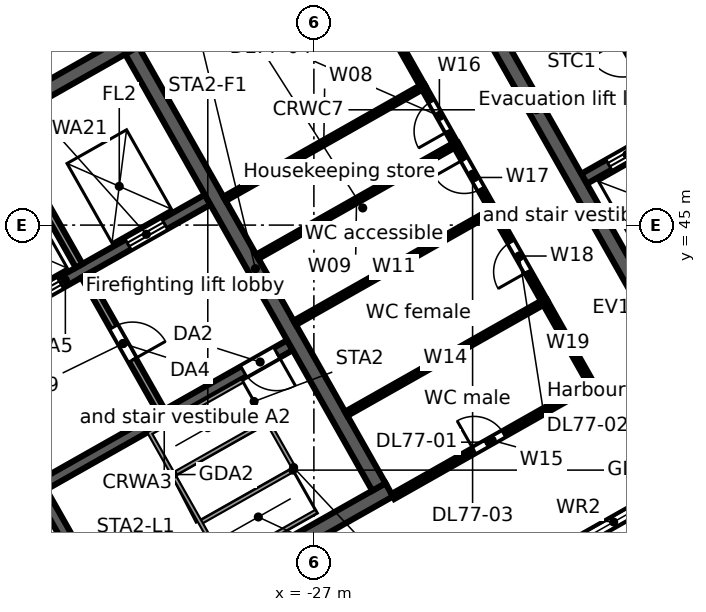
"""IFC4 building model, lengths in metres.
Left out: names, types, materials, properties, quantities, classifications, styles, units other than length and angle.
Written with IfcOpenShell. Run it as: python <this file> out.ifc"""

import sys

from ifc_helpers import new_model, si_unit, direction, frame, frame_2d, origin, place, context, subcontext, project, spatial, rectangle, extrude, element, fill, save


model = new_model("IFC4")
c1 = context("Model", 3, precision=1e-05, world=origin(), true_north=direction((0.0, 1.0)))
c2 = subcontext(c1, "Body", "Model", "MODEL_VIEW")
j1 = project(units=[si_unit("LENGTHUNIT", "METRE"), si_unit("PLANEANGLEUNIT", "RADIAN")], contexts=[c1])
p1 = place(None, origin())
s1 = spatial("IfcSite", under=j1, at=p1, CompositionType="ELEMENT")
p2 = place(p1, origin())
s2 = spatial("IfcBuilding", under=s1, at=p2, CompositionType="ELEMENT")
p3 = place(p2, frame((0.0, 0.0, 339.3)))
s3 = spatial("IfcBuildingStorey", under=s2, at=p3, CompositionType="ELEMENT", Elevation=339.3)
p4 = place(p3, frame((-3.017, 46.293, 0.0), z_axis=(0.0, 0.0, 1.0), x_axis=(-0.870355474887, -0.492423950812, 0.0)))
e1 = element("IfcWall", 1, at=p4, inside=s3, PredefinedType="STANDARD", context=c2, shape_type="SweptSolid", body=[
    extrude(rectangle(XDim=40.34, YDim=0.25, at=frame_2d((20.17, 0.0))), origin(), (0.0, 0.0, 1.0), 3.52),
])
p5 = place(p4, frame((37.428, 0.0, 0.8)))
e2 = element("IfcOpeningElement", 2, at=p5, cuts=e1, PredefinedType="OPENING", context=c2, shape_type="SweptSolid", body=[
    extrude(rectangle(XDim=2.4, YDim=2.2, at=frame_2d((1.2, 1.1))), frame((0.0, 0.135, 0.0), z_axis=(0.0, -1.0, 0.0), x_axis=(1.0, 0.0, 0.0)), (0.0, 0.0, 1.0), 0.27),
])
p6 = place(p4, frame((34.372, 0.0, 0.0)))
e3 = element("IfcOpeningElement", 3, at=p6, cuts=e1, PredefinedType="OPENING", context=c2, shape_type="SweptSolid", body=[
    extrude(rectangle(XDim=1.8, YDim=2.4, at=frame_2d((0.9, 1.2))), frame((0.0, 0.135, 0.0), z_axis=(0.0, -1.0, 0.0), x_axis=(1.0, 0.0, 0.0)), (0.0, 0.0, 1.0), 0.27),
])
p7 = place(p4, frame((30.716, 0.0, 0.8)))
e4 = element("IfcOpeningElement", 4, at=p7, cuts=e1, PredefinedType="OPENING", context=c2, shape_type="SweptSolid", body=[
    extrude(rectangle(XDim=2.4, YDim=2.2, at=frame_2d((1.2, 1.1))), frame((0.0, 0.135, 0.0), z_axis=(0.0, -1.0, 0.0), x_axis=(1.0, 0.0, 0.0)), (0.0, 0.0, 1.0), 0.27),
])
p8 = place(p4, frame((27.36, 0.0, 0.8)))
e5 = element("IfcOpeningElement", 5, at=p8, cuts=e1, PredefinedType="OPENING", context=c2, shape_type="SweptSolid", body=[
    extrude(rectangle(XDim=2.4, YDim=2.2, at=frame_2d((1.2, 1.1))), frame((0.0, 0.135, 0.0), z_axis=(0.0, -1.0, 0.0), x_axis=(1.0, 0.0, 0.0)), (0.0, 0.0, 1.0), 0.27),
])
p9 = place(p4, frame((24.304, 0.0, 0.0)))
e6 = element("IfcOpeningElement", 6, at=p9, cuts=e1, PredefinedType="OPENING", context=c2, shape_type="SweptSolid", body=[
    extrude(rectangle(XDim=1.8, YDim=2.4, at=frame_2d((0.9, 1.2))), frame((0.0, 0.135, 0.0), z_axis=(0.0, -1.0, 0.0), x_axis=(1.0, 0.0, 0.0)), (0.0, 0.0, 1.0), 0.27),
])
p10 = place(p4, frame((20.648, 0.0, 0.8)))
e7 = element("IfcOpeningElement", 7, at=p10, cuts=e1, PredefinedType="OPENING", context=c2, shape_type="SweptSolid", body=[
    extrude(rectangle(XDim=2.4, YDim=2.2, at=frame_2d((1.2, 1.1))), frame((0.0, 0.135, 0.0), z_axis=(0.0, -1.0, 0.0), x_axis=(1.0, 0.0, 0.0)), (0.0, 0.0, 1.0), 0.27),
])
p11 = place(p4, frame((17.292, 0.0, 0.8)))
e8 = element("IfcOpeningElement", 8, at=p11, cuts=e1, PredefinedType="OPENING", context=c2, shape_type="SweptSolid", body=[
    extrude(rectangle(XDim=2.4, YDim=2.2, at=frame_2d((1.2, 1.1))), frame((0.0, 0.135, 0.0), z_axis=(0.0, -1.0, 0.0), x_axis=(1.0, 0.0, 0.0)), (0.0, 0.0, 1.0), 0.27),
])
p12 = place(p4, frame((14.236, 0.0, 0.0)))
e9 = element("IfcOpeningElement", 9, at=p12, cuts=e1, PredefinedType="OPENING", context=c2, shape_type="SweptSolid", body=[
    extrude(rectangle(XDim=1.8, YDim=2.4, at=frame_2d((0.9, 1.2))), frame((0.0, 0.135, 0.0), z_axis=(0.0, -1.0, 0.0), x_axis=(1.0, 0.0, 0.0)), (0.0, 0.0, 1.0), 0.27),
])
p13 = place(p4, frame((10.58, 0.0, 0.8)))
e10 = element("IfcOpeningElement", 10, at=p13, cuts=e1, PredefinedType="OPENING", context=c2, shape_type="SweptSolid", body=[
    extrude(rectangle(XDim=2.4, YDim=2.2, at=frame_2d((1.2, 1.1))), frame((0.0, 0.135, 0.0), z_axis=(0.0, -1.0, 0.0), x_axis=(1.0, 0.0, 0.0)), (0.0, 0.0, 1.0), 0.27),
])
p14 = place(p4, frame((7.224, 0.0, 0.8)))
e11 = element("IfcOpeningElement", 11, at=p14, cuts=e1, PredefinedType="OPENING", context=c2, shape_type="SweptSolid", body=[
    extrude(rectangle(XDim=2.4, YDim=2.2, at=frame_2d((1.2, 1.1))), frame((0.0, 0.135, 0.0), z_axis=(0.0, -1.0, 0.0), x_axis=(1.0, 0.0, 0.0)), (0.0, 0.0, 1.0), 0.27),
])
p15 = place(p4, frame((4.168, 0.0, 0.0)))
e12 = element("IfcOpeningElement", 12, at=p15, cuts=e1, PredefinedType="OPENING", context=c2, shape_type="SweptSolid", body=[
    extrude(rectangle(XDim=1.8, YDim=2.4, at=frame_2d((0.9, 1.2))), frame((0.0, 0.135, 0.0), z_axis=(0.0, -1.0, 0.0), x_axis=(1.0, 0.0, 0.0)), (0.0, 0.0, 1.0), 0.27),
])
p16 = place(p4, frame((0.512, 0.0, 0.8)))
e13 = element("IfcOpeningElement", 13, at=p16, cuts=e1, PredefinedType="OPENING", context=c2, shape_type="SweptSolid", body=[
    extrude(rectangle(XDim=2.4, YDim=2.2, at=frame_2d((1.2, 1.1))), frame((0.0, 0.135, 0.0), z_axis=(0.0, -1.0, 0.0), x_axis=(1.0, 0.0, 0.0)), (0.0, 0.0, 1.0), 0.27),
])
p17 = place(p3, frame((-39.813, 29.662, 0.0), z_axis=(0.0, 0.0, 1.0), x_axis=(0.870350116061, 0.492433422375, 0.0)))
e14 = element("IfcWall", 14, at=p17, inside=s3, PredefinedType="SOLIDWALL", context=c2, shape_type="SweptSolid", body=[
    extrude(rectangle(XDim=17.0, YDim=0.4, at=frame_2d((8.5, 0.0))), origin(), (0.0, 0.0, 1.0), 3.52),
])
p18 = place(p17, frame((7.2, 0.0, 0.0)))
e15 = element("IfcOpeningElement", 15, at=p18, cuts=e14, PredefinedType="OPENING", context=c2, shape_type="SweptSolid", body=[
    extrude(rectangle(XDim=1.2, YDim=2.1, at=frame_2d((0.6, 1.05))), frame((0.0, 0.21, 0.0), z_axis=(0.0, -1.0, 0.0), x_axis=(1.0, 0.0, 0.0)), (0.0, 0.0, 1.0), 0.42),
])
p19 = place(p3, frame((-34.245, 38.097, 0.0), z_axis=(0.0, 0.0, 1.0), x_axis=(0.870356351998, 0.492422400523, 0.0)))
e16 = element("IfcWall", 16, at=p19, inside=s3, PredefinedType="SOLIDWALL", context=c2, shape_type="SweptSolid", body=[
    extrude(rectangle(XDim=7.6, YDim=0.3, at=frame_2d((3.8, 0.0))), origin(), (0.0, 0.0, 1.0), 3.52),
])
p20 = place(p19, frame((6.2, 0.0, 0.0)))
e17 = element("IfcOpeningElement", 17, at=p20, cuts=e16, PredefinedType="OPENING", context=c2, shape_type="SweptSolid", body=[
    extrude(rectangle(XDim=1.0, YDim=2.1, at=frame_2d((0.5, 1.05))), frame((0.0, 0.16, 0.0), z_axis=(0.0, -1.0, 0.0), x_axis=(1.0, 0.0, 0.0)), (0.0, 0.0, 1.0), 0.32),
])
p21 = place(p3, frame((-37.282, 41.435, 0.0), z_axis=(0.0, 0.0, 1.0), x_axis=(0.870361315115, 0.492413628113, 0.0)))
e18 = element("IfcWall", 18, at=p21, inside=s3, PredefinedType="SOLIDWALL", context=c2, shape_type="SweptSolid", body=[
    extrude(rectangle(XDim=8.6, YDim=0.3, at=frame_2d((4.3, 0.0))), origin(), (0.0, 0.0, 1.0), 3.52),
])
p22 = place(p21, frame((0.65, 0.0, 0.0)))
e19 = element("IfcOpeningElement", 19, at=p22, cuts=e18, PredefinedType="OPENING", context=c2, shape_type="SweptSolid", body=[
    extrude(rectangle(XDim=1.1, YDim=2.1, at=frame_2d((0.55, 1.05))), frame((0.0, 0.16, 0.0), z_axis=(0.0, -1.0, 0.0), x_axis=(1.0, 0.0, 0.0)), (0.0, 0.0, 1.0), 0.32),
])
p23 = place(p21, frame((3.05, 0.0, 0.0)))
e20 = element("IfcOpeningElement", 20, at=p23, cuts=e18, PredefinedType="OPENING", context=c2, shape_type="SweptSolid", body=[
    extrude(rectangle(XDim=1.1, YDim=2.1, at=frame_2d((0.55, 1.05))), frame((0.0, 0.16, 0.0), z_axis=(0.0, -1.0, 0.0), x_axis=(1.0, 0.0, 0.0)), (0.0, 0.0, 1.0), 0.32),
])
p24 = place(p21, frame((6.2, 0.0, 0.0)))
e21 = element("IfcOpeningElement", 21, at=p24, cuts=e18, PredefinedType="OPENING", context=c2, shape_type="SweptSolid", body=[
    extrude(rectangle(XDim=1.1, YDim=2.1, at=frame_2d((0.55, 1.05))), frame((0.0, 0.16, 0.0), z_axis=(0.0, -1.0, 0.0), x_axis=(1.0, 0.0, 0.0)), (0.0, 0.0, 1.0), 0.32),
])
p25 = place(p3, frame((-46.51, 41.499, 0.0), z_axis=(0.0, 0.0, 1.0), x_axis=(0.870356271124, 0.492422543467, 0.0)))
e22 = element("IfcWall", 22, at=p25, inside=s3, PredefinedType="SOLIDWALL", context=c2, shape_type="SweptSolid", body=[
    extrude(rectangle(XDim=17.0, YDim=0.4, at=frame_2d((8.5, 0.0))), origin(), (0.0, 0.0, 1.0), 3.52),
])
p26 = place(p3, frame((-34.171, 37.967, 0.0), z_axis=(0.0, 0.0, 1.0), x_axis=(0.492422543467, -0.870356271124, 0.0)))
e23 = element("IfcWall", 23, at=p26, inside=s3, PredefinedType="SOLIDWALL", context=c2, shape_type="SweptSolid", body=[
    extrude(rectangle(XDim=4.25, YDim=0.3, at=frame_2d((2.125, 0.0))), origin(), (0.0, 0.0, 1.0), 3.52),
])
p27 = place(p3, frame((-33.031, 43.667, 0.0), z_axis=(0.0, 0.0, 1.0), x_axis=(0.492408451753, -0.87036424366, 0.0)))
e24 = element("IfcWall", 24, at=p27, inside=s3, PredefinedType="PARTITIONING", context=c2, shape_type="SweptSolid", body=[
    extrude(rectangle(XDim=4.1, YDim=0.2, at=frame_2d((2.05, 0.0))), origin(), (0.0, 0.0, 1.0), 3.52),
])
p28 = place(p27, frame((1.55, 0.0, 0.0)))
e25 = element("IfcOpeningElement", 25, at=p28, cuts=e24, PredefinedType="OPENING", context=c2, shape_type="SweptSolid", body=[
    extrude(rectangle(XDim=1.0, YDim=2.1, at=frame_2d((0.5, 1.05))), frame((0.0, 0.11, 0.0), z_axis=(0.0, -1.0, 0.0), x_axis=(1.0, 0.0, 0.0)), (0.0, 0.0, 1.0), 0.22),
])
p29 = place(p3, frame((-35.271, 47.628, 0.0), z_axis=(0.0, 0.0, 1.0), x_axis=(0.492422543467, -0.870356271124, 0.0)))
e26 = element("IfcWall", 26, at=p29, inside=s3, PredefinedType="SOLIDWALL", context=c2, shape_type="SweptSolid", body=[
    extrude(rectangle(XDim=4.25, YDim=0.2, at=frame_2d((2.125, 0.0))), origin(), (0.0, 0.0, 1.0), 3.52),
])
p30 = place(p3, frame((-31.79, 49.597, 0.0), z_axis=(0.0, 0.0, 1.0), x_axis=(0.492421663121, -0.870356769198, 0.0)))
e27 = element("IfcWall", 27, at=p30, inside=s3, PredefinedType="SOLIDWALL", context=c2, shape_type="SweptSolid", body=[
    extrude(rectangle(XDim=13.2, YDim=0.4, at=frame_2d((6.6, 0.0))), origin(), (0.0, 0.0, 1.0), 3.52),
])
p31 = place(p3, frame((-19.892, 46.218, 0.0), z_axis=(0.0, 0.0, 1.0), x_axis=(0.870341639186, 0.492448404505, 0.0)))
e28 = element("IfcWall", 28, at=p31, inside=s3, PredefinedType="SOLIDWALL", context=c2, shape_type="SweptSolid", body=[
    extrude(rectangle(XDim=5.1, YDim=0.3, at=frame_2d((2.55, 0.0))), origin(), (0.0, 0.0, 1.0), 3.52),
])
p32 = place(p31, frame((0.75, 0.0, 0.0)))
e29 = element("IfcOpeningElement", 29, at=p32, cuts=e28, PredefinedType="OPENING", context=c2, shape_type="SweptSolid", body=[
    extrude(rectangle(XDim=1.1, YDim=2.1, at=frame_2d((0.55, 1.05))), frame((0.0, 0.16, 0.0), z_axis=(0.0, -1.0, 0.0), x_axis=(1.0, 0.0, 0.0)), (0.0, 0.0, 1.0), 0.32),
])
p33 = place(p31, frame((3.35, 0.0, 0.0)))
e30 = element("IfcOpeningElement", 30, at=p33, cuts=e28, PredefinedType="OPENING", context=c2, shape_type="SweptSolid", body=[
    extrude(rectangle(XDim=1.1, YDim=2.1, at=frame_2d((0.55, 1.05))), frame((0.0, 0.16, 0.0), z_axis=(0.0, -1.0, 0.0), x_axis=(1.0, 0.0, 0.0)), (0.0, 0.0, 1.0), 0.32),
])
p34 = place(p3, frame((-24.4, 53.779, 0.0), z_axis=(0.0, 0.0, 1.0), x_axis=(0.492421663121, -0.870356769198, 0.0)))
e31 = element("IfcWall", 31, at=p34, inside=s3, PredefinedType="SOLIDWALL", context=c2, shape_type="SweptSolid", body=[
    extrude(rectangle(XDim=13.2, YDim=0.4, at=frame_2d((6.6, 0.0))), origin(), (0.0, 0.0, 1.0), 3.52),
])
p35 = place(p3, frame((-19.635, 51.246, 0.0), z_axis=(0.0, 0.0, 1.0), x_axis=(0.492408451753, -0.87036424366, 0.0)))
e32 = element("IfcWall", 32, at=p35, inside=s3, PredefinedType="PARTITIONING", context=c2, shape_type="SweptSolid", body=[
    extrude(rectangle(XDim=4.1, YDim=0.2, at=frame_2d((2.05, 0.0))), origin(), (0.0, 0.0, 1.0), 3.52),
])
p36 = place(p35, frame((1.55, 0.0, 0.0)))
e33 = element("IfcOpeningElement", 33, at=p36, cuts=e32, PredefinedType="OPENING", context=c2, shape_type="SweptSolid", body=[
    extrude(rectangle(XDim=1.0, YDim=2.1, at=frame_2d((0.5, 1.05))), frame((0.0, 0.11, 0.0), z_axis=(0.0, -1.0, 0.0), x_axis=(1.0, 0.0, 0.0)), (0.0, 0.0, 1.0), 0.22),
])
p37 = place(p3, frame((-29.35, 45.692, 0.0), z_axis=(0.0, 0.0, 1.0), x_axis=(0.870318719588, 0.492488909859, 0.0)))
e34 = element("IfcWall", 34, at=p37, inside=s3, PredefinedType="PARTITIONING", context=c2, shape_type="SweptSolid", body=[
    extrude(rectangle(XDim=6.0, YDim=0.125, at=frame_2d((3.0, 0.0))), origin(), (0.0, 0.0, 1.0), 3.52),
])
p38 = place(p3, frame((-28.489, 44.169, 0.0), z_axis=(0.0, 0.0, 1.0), x_axis=(0.870308850352, 0.492506350211, 0.0)))
e35 = element("IfcWall", 35, at=p38, inside=s3, PredefinedType="PARTITIONING", context=c2, shape_type="SweptSolid", body=[
    extrude(rectangle(XDim=6.0, YDim=0.125, at=frame_2d((3.0, 0.0))), origin(), (0.0, 0.0, 1.0), 3.52),
])
p39 = place(p3, frame((-27.504, 42.428, 0.0), z_axis=(0.0, 0.0, 1.0), x_axis=(0.870308850352, 0.492506350211, 0.0)))
e36 = element("IfcWall", 36, at=p39, inside=s3, PredefinedType="PARTITIONING", context=c2, shape_type="SweptSolid", body=[
    extrude(rectangle(XDim=6.0, YDim=0.125, at=frame_2d((3.0, 0.0))), origin(), (0.0, 0.0, 1.0), 2.792),
])
p40 = place(p3, frame((-26.59, 52.999, 0.0), z_axis=(0.0, 0.0, 1.0), x_axis=(0.492406341242, -0.870365437678, 0.0)))
e37 = element("IfcWall", 37, at=p40, inside=s3, PredefinedType="PARTITIONING", context=c2, shape_type="SweptSolid", body=[
    extrude(rectangle(XDim=5.0, YDim=0.125, at=frame_2d((2.5, 0.0))), origin(), (0.0, 0.0, 1.0), 3.52),
])
p41 = place(p40, frame((1.95, 0.0, 0.0)))
e38 = element("IfcOpeningElement", 38, at=p41, cuts=e37, PredefinedType="OPENING", context=c2, shape_type="SweptSolid", body=[
    extrude(rectangle(XDim=0.9, YDim=2.1, at=frame_2d((0.45, 1.05))), frame((0.0, 0.073, 0.0), z_axis=(0.0, -1.0, 0.0), x_axis=(1.0, 0.0, 0.0)), (0.0, 0.0, 1.0), 0.145),
])
p42 = place(p3, frame((-26.15, 40.035, 0.0), z_axis=(0.0, 0.0, 1.0), x_axis=(0.870418064747, 0.492313307317, 0.0)))
e39 = element("IfcWall", 39, at=p42, inside=s3, PredefinedType="PARTITIONING", context=c2, shape_type="SweptSolid", body=[
    extrude(rectangle(XDim=6.0, YDim=0.125, at=frame_2d((3.0, 0.0))), origin(), (0.0, 0.0, 1.0), 2.792),
])
p43 = place(p3, frame((-24.919, 37.859, 0.0), z_axis=(0.0, 0.0, 1.0), x_axis=(0.870308850352, 0.492506350211, 0.0)))
e40 = element("IfcWall", 40, at=p43, inside=s3, PredefinedType="PARTITIONING", context=c2, shape_type="SweptSolid", body=[
    extrude(rectangle(XDim=6.0, YDim=0.15, at=frame_2d((3.0, 0.0))), origin(), (0.0, 0.0, 1.0), 2.792),
])
p44 = place(p43, frame((2.45, 0.0, 0.0)))
e41 = element("IfcOpeningElement", 41, at=p44, cuts=e40, PredefinedType="OPENING", context=c2, shape_type="SweptSolid", body=[
    extrude(rectangle(XDim=0.9, YDim=2.1, at=frame_2d((0.45, 1.05))), frame((0.0, 0.085, 0.0), z_axis=(0.0, -1.0, 0.0), x_axis=(1.0, 0.0, 0.0)), (0.0, 0.0, 1.0), 0.17),
])
p45 = place(p3, frame((-24.128, 48.647, 0.0), z_axis=(0.0, 0.0, 1.0), x_axis=(0.492075650803, -0.870552441778, 0.0)))
e42 = element("IfcWall", 42, at=p45, inside=s3, PredefinedType="PARTITIONING", context=c2, shape_type="SweptSolid", body=[
    extrude(rectangle(XDim=1.75, YDim=0.125, at=frame_2d((0.875, 0.0))), origin(), (0.0, 0.0, 1.0), 3.52),
])
p46 = place(p45, frame((0.45, 0.0, 0.0)))
e43 = element("IfcOpeningElement", 43, at=p46, cuts=e42, PredefinedType="OPENING", context=c2, shape_type="SweptSolid", body=[
    extrude(rectangle(XDim=0.9, YDim=2.1, at=frame_2d((0.45, 1.05))), frame((0.0, 0.073, 0.0), z_axis=(0.0, -1.0, 0.0), x_axis=(1.0, 0.0, 0.0)), (0.0, 0.0, 1.0), 0.145),
])
p47 = place(p3, frame((-23.267, 47.124, 0.0), z_axis=(0.0, 0.0, 1.0), x_axis=(0.492467412326, -0.870330884088, 0.0)))
e44 = element("IfcWall", 44, at=p47, inside=s3, PredefinedType="PARTITIONING", context=c2, shape_type="SweptSolid", body=[
    extrude(rectangle(XDim=2.0, YDim=0.15, at=frame_2d((1.0, 0.0))), origin(), (0.0, 0.0, 1.0), 2.792),
])
p48 = place(p47, frame((0.45, 0.0, 0.0)))
e45 = element("IfcOpeningElement", 45, at=p48, cuts=e44, PredefinedType="OPENING", context=c2, shape_type="SweptSolid", body=[
    extrude(rectangle(XDim=0.9, YDim=2.1, at=frame_2d((0.45, 1.05))), frame((0.0, 0.085, 0.0), z_axis=(0.0, -1.0, 0.0), x_axis=(1.0, 0.0, 0.0)), (0.0, 0.0, 1.0), 0.17),
])
p49 = place(p3, frame((-22.282, 45.383, 0.0), z_axis=(0.0, 0.0, 1.0), x_axis=(0.492560173591, -0.870278389592, 0.0)))
e46 = element("IfcWall", 46, at=p49, inside=s3, PredefinedType="PARTITIONING", context=c2, shape_type="SweptSolid", body=[
    extrude(rectangle(XDim=2.751, YDim=0.15, at=frame_2d((1.375, 0.0))), origin(), (0.0, 0.0, 1.0), 3.52),
])
p50 = place(p49, frame((0.95, 0.0, 0.0)))
e47 = element("IfcOpeningElement", 47, at=p50, cuts=e46, PredefinedType="OPENING", context=c2, shape_type="SweptSolid", body=[
    extrude(rectangle(XDim=0.9, YDim=2.1, at=frame_2d((0.45, 1.05))), frame((0.0, 0.085, 0.0), z_axis=(0.0, -1.0, 0.0), x_axis=(1.0, 0.0, 0.0)), (0.0, 0.0, 1.0), 0.17),
])
p51 = place(p3, frame((-20.927, 42.989, 0.0), z_axis=(0.0, 0.0, 1.0), x_axis=(0.492240758669, -0.870459094677, 0.0)))
e48 = element("IfcWall", 48, at=p51, inside=s3, PredefinedType="PARTITIONING", context=c2, shape_type="SweptSolid", body=[
    extrude(rectangle(XDim=2.499, YDim=0.15, at=frame_2d((1.25, 0.0))), origin(), (0.0, 0.0, 1.0), 3.52),
])
p52 = place(p11, origin())
e49 = element("IfcWindow", 49, at=p52, inside=s3, PartitioningType="SINGLE_PANEL", PredefinedType="WINDOW", context=c2, shape_type="SweptSolid", body=[
    extrude(rectangle(XDim=2.4, YDim=2.2, at=frame_2d((1.2, 1.1))), frame((0.0, 0.03, 0.0), z_axis=(0.0, -1.0, 0.0), x_axis=(1.0, 0.0, 0.0)), (0.0, 0.0, 1.0), 0.06),
])
fill(e8, e49)
p53 = place(p23, origin())
e50 = element("IfcDoor", 50, at=p53, inside=s3, OperationType="DOUBLE_DOOR_SLIDING", PredefinedType="DOOR", context=c2, shape_type="SweptSolid", body=[
    extrude(rectangle(XDim=1.1, YDim=2.1, at=frame_2d((0.55, 1.05))), frame((0.0, 0.025, 0.0), z_axis=(0.0, -1.0, 0.0), x_axis=(1.0, 0.0, 0.0)), (0.0, 0.0, 1.0), 0.05),
])
fill(e20, e50)
p54 = place(p24, origin())
e51 = element("IfcDoor", 51, at=p54, inside=s3, OperationType="DOUBLE_DOOR_SLIDING", PredefinedType="DOOR", context=c2, shape_type="SweptSolid", body=[
    extrude(rectangle(XDim=1.1, YDim=2.1, at=frame_2d((0.55, 1.05))), frame((0.0, 0.025, 0.0), z_axis=(0.0, -1.0, 0.0), x_axis=(1.0, 0.0, 0.0)), (0.0, 0.0, 1.0), 0.05),
])
fill(e21, e51)
p55 = place(p20, frame((1.0, 0.0, 0.0), z_axis=(0.0, 0.0, 1.0), x_axis=(-1.0, 0.0, 0.0)))
e52 = element("IfcDoor", 52, at=p55, inside=s3, OperationType="SINGLE_SWING_LEFT", PredefinedType="DOOR", context=c2, shape_type="SweptSolid", body=[
    extrude(rectangle(XDim=1.0, YDim=2.1, at=frame_2d((0.5, 1.05))), frame((0.0, 0.025, 0.0), z_axis=(0.0, -1.0, 0.0), x_axis=(1.0, 0.0, 0.0)), (0.0, 0.0, 1.0), 0.05),
])
fill(e17, e52)
p56 = place(p28, origin())
e53 = element("IfcDoor", 53, at=p56, inside=s3, OperationType="SINGLE_SWING_RIGHT", PredefinedType="DOOR", context=c2, shape_type="SweptSolid", body=[
    extrude(rectangle(XDim=1.0, YDim=2.1, at=frame_2d((0.5, 1.05))), frame((0.0, 0.025, 0.0), z_axis=(0.0, -1.0, 0.0), x_axis=(1.0, 0.0, 0.0)), (0.0, 0.0, 1.0), 0.05),
])
fill(e25, e53)
p57 = place(p32, origin())
e54 = element("IfcDoor", 54, at=p57, inside=s3, OperationType="DOUBLE_DOOR_SLIDING", PredefinedType="DOOR", context=c2, shape_type="SweptSolid", body=[
    extrude(rectangle(XDim=1.1, YDim=2.1, at=frame_2d((0.55, 1.05))), frame((0.0, 0.025, 0.0), z_axis=(0.0, -1.0, 0.0), x_axis=(1.0, 0.0, 0.0)), (0.0, 0.0, 1.0), 0.05),
])
fill(e29, e54)
p58 = place(p36, frame((1.0, 0.0, 0.0), z_axis=(0.0, 0.0, 1.0), x_axis=(-1.0, 0.0, 0.0)))
e55 = element("IfcDoor", 55, at=p58, inside=s3, OperationType="SINGLE_SWING_RIGHT", PredefinedType="DOOR", context=c2, shape_type="SweptSolid", body=[
    extrude(rectangle(XDim=1.0, YDim=2.1, at=frame_2d((0.5, 1.05))), frame((0.0, 0.025, 0.0), z_axis=(0.0, -1.0, 0.0), x_axis=(1.0, 0.0, 0.0)), (0.0, 0.0, 1.0), 0.05),
])
fill(e33, e55)
p59 = place(p44, origin())
e56 = element("IfcDoor", 56, at=p59, inside=s3, OperationType="SINGLE_SWING_LEFT", PredefinedType="DOOR", context=c2, shape_type="SweptSolid", body=[
    extrude(rectangle(XDim=0.9, YDim=2.1, at=frame_2d((0.45, 1.05))), frame((0.0, 0.025, 0.0), z_axis=(0.0, -1.0, 0.0), x_axis=(1.0, 0.0, 0.0)), (0.0, 0.0, 1.0), 0.05),
])
fill(e41, e56)
p60 = place(p50, frame((0.9, 0.0, 0.0), z_axis=(0.0, 0.0, 1.0), x_axis=(-1.0, 0.0, 0.0)))
e57 = element("IfcDoor", 57, at=p60, inside=s3, OperationType="SINGLE_SWING_LEFT", PredefinedType="DOOR", context=c2, shape_type="SweptSolid", body=[
    extrude(rectangle(XDim=0.9, YDim=2.1, at=frame_2d((0.45, 1.05))), frame((0.0, 0.025, 0.0), z_axis=(0.0, -1.0, 0.0), x_axis=(1.0, 0.0, 0.0)), (0.0, 0.0, 1.0), 0.05),
])
fill(e47, e57)
p61 = place(p48, frame((0.9, 0.0, 0.0), z_axis=(0.0, 0.0, 1.0), x_axis=(-1.0, 0.0, 0.0)))
e58 = element("IfcDoor", 58, at=p61, inside=s3, OperationType="SINGLE_SWING_RIGHT", PredefinedType="DOOR", context=c2, shape_type="SweptSolid", body=[
    extrude(rectangle(XDim=0.9, YDim=2.1, at=frame_2d((0.45, 1.05))), frame((0.0, 0.025, 0.0), z_axis=(0.0, -1.0, 0.0), x_axis=(1.0, 0.0, 0.0)), (0.0, 0.0, 1.0), 0.05),
])
fill(e45, e58)
p62 = place(p46, frame((0.9, 0.0, 0.0), z_axis=(0.0, 0.0, 1.0), x_axis=(-1.0, 0.0, 0.0)))
e59 = element("IfcDoor", 59, at=p62, inside=s3, OperationType="SINGLE_SWING_LEFT", PredefinedType="DOOR", context=c2, shape_type="SweptSolid", body=[
    extrude(rectangle(XDim=0.9, YDim=2.1, at=frame_2d((0.45, 1.05))), frame((0.0, 0.025, 0.0), z_axis=(0.0, -1.0, 0.0), x_axis=(1.0, 0.0, 0.0)), (0.0, 0.0, 1.0), 0.05),
])
fill(e43, e59)
save(model, sys.argv[1])
